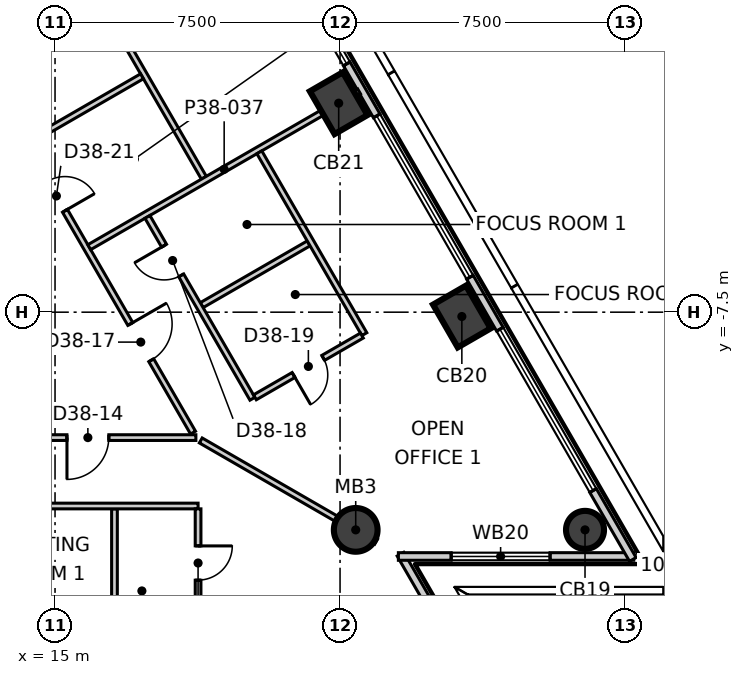
"""IFC4 building model, lengths in metres.
Left out: names, types, materials, properties, quantities, classifications, styles, units other than length and angle.
Written with IfcOpenShell. Run it as: python <this file> out.ifc"""

import sys

from ifc_helpers import new_model, si_unit, direction, frame, frame_2d, origin, origin_2d, place, context, subcontext, project, spatial, rectangle, circle, extrude, element, fill, save


model = new_model("IFC4")
c1 = context("Model", 3, precision=1e-05, world=origin(), true_north=direction((0.0, 1.0)))
c2 = subcontext(c1, "Body", "Model", "MODEL_VIEW")
j1 = project(units=[si_unit("LENGTHUNIT", "METRE"), si_unit("PLANEANGLEUNIT", "RADIAN")], contexts=[c1])
p1 = place(None, origin())
s1 = spatial("IfcSite", under=j1, at=p1, CompositionType="ELEMENT")
p2 = place(p1, origin())
s2 = spatial("IfcBuilding", under=s1, at=p2, CompositionType="ELEMENT")
p3 = place(p2, frame((0.0, 0.0, 164.3)))
s3 = spatial("IfcBuildingStorey", under=s2, at=p3, CompositionType="ELEMENT", Elevation=164.3)
p4 = place(p3, frame((28.946, -13.228, -0.3), z_axis=(0.0, 0.0, 1.0), x_axis=(-0.5, 0.866025403784, 0.0)))
e1 = element("IfcColumn", 1, at=p4, inside=s3, PredefinedType="COLUMN", context=c2, shape_type="SweptSolid", body=[
    extrude(circle(Radius=0.5, at=origin_2d()), origin(), (0.0, 0.0, 1.0), 4.0),
])
for number, where, z_axis, x_axis in (
    (2, (25.705, -7.614, -0.3), (0.0, 0.0, 1.0), (-0.5, 0.866, 0.0)),
    (3, (22.464, -2.001, -0.3), (0.0, 0.0, 1.0), (-0.5, 0.866, 0.0)),
):
    element("IfcColumn", number, at=place(p3, frame(where, z_axis=z_axis, x_axis=x_axis)), inside=s3, PredefinedType="COLUMN", context=c2, shape_type="SweptSolid", body=[
        extrude(rectangle(XDim=1.3, YDim=1.0, at=origin_2d()), origin(), (0.0, 0.0, 1.0), 4.0),
    ])
p5 = place(p3, frame((22.912, -13.228, -0.3), z_axis=(0.0, 0.0, 1.0), x_axis=(1.0, 0.0, 0.0)))
e4 = element("IfcColumn", 4, at=p5, inside=s3, PredefinedType="COLUMN", context=c2, shape_type="SweptSolid", body=[
    extrude(circle(Radius=0.575, at=origin_2d()), origin(), (0.0, 0.0, 1.0), 4.0),
])
p6 = place(p3, frame((27.187, -19.232, 0.0), z_axis=(0.0, 0.0, 1.0), x_axis=(-0.499932836684, 0.86606417707, 0.0)))
e5 = element("IfcWall", 5, at=p6, inside=s3, PredefinedType="ELEMENTEDWALL", context=c2, shape_type="SweptSolid", body=[
    extrude(rectangle(XDim=6.195, YDim=0.2, at=frame_2d((3.097, 0.0))), origin(), (0.0, 0.0, 1.0), 3.7),
])
p7 = place(p6, frame((1.99, 0.0, 0.9)))
e6 = element("IfcOpeningElement", 6, at=p7, cuts=e5, PredefinedType="OPENING", context=c2, shape_type="SweptSolid", body=[
    extrude(rectangle(XDim=2.6, YDim=2.5, at=frame_2d((1.3, 1.25))), frame((0.0, 0.11, 0.0), z_axis=(0.0, -1.0, 0.0), x_axis=(1.0, 0.0, 0.0)), (0.0, 0.0, 1.0), 0.22),
])
p8 = place(p3, frame((24.035, -13.928, 0.0), z_axis=(0.0, 0.0, 1.0), x_axis=(1.0, 0.0, 0.0)))
e7 = element("IfcWall", 7, at=p8, inside=s3, PredefinedType="ELEMENTEDWALL", context=c2, shape_type="SweptSolid", body=[
    extrude(rectangle(XDim=6.194, YDim=0.2, at=frame_2d((3.097, 0.0))), origin(), (0.0, 0.0, 1.0), 3.7),
])
p9 = place(p8, frame((1.39, 0.0, 0.9)))
e8 = element("IfcOpeningElement", 8, at=p9, cuts=e7, PredefinedType="OPENING", context=c2, shape_type="SweptSolid", body=[
    extrude(rectangle(XDim=2.6, YDim=2.5, at=frame_2d((1.3, 1.25))), frame((0.0, 0.11, 0.0), z_axis=(0.0, -1.0, 0.0), x_axis=(1.0, 0.0, 0.0)), (0.0, 0.0, 1.0), 0.22),
])
p10 = place(p3, frame((30.204, -14.006, 0.0), z_axis=(0.0, 0.0, 1.0), x_axis=(-0.500008017777, 0.866020774669, 0.0)))
e9 = element("IfcWall", 9, at=p10, inside=s3, PredefinedType="ELEMENTEDWALL", context=c2, shape_type="SweptSolid", body=[
    extrude(rectangle(XDim=54.443, YDim=0.2, at=frame_2d((27.222, 0.0))), origin(), (0.0, 0.0, 1.0), 3.7),
])
p11 = place(p10, frame((2.094, 0.0, 0.9)))
e10 = element("IfcOpeningElement", 10, at=p11, cuts=e9, PredefinedType="OPENING", context=c2, shape_type="SweptSolid", body=[
    extrude(rectangle(XDim=4.9, YDim=2.5, at=frame_2d((2.45, 1.25))), frame((0.0, 0.11, 0.0), z_axis=(0.0, -1.0, 0.0), x_axis=(1.0, 0.0, 0.0)), (0.0, 0.0, 1.0), 0.22),
])
p12 = place(p10, frame((8.576, 0.0, 0.9)))
e11 = element("IfcOpeningElement", 11, at=p12, cuts=e9, PredefinedType="OPENING", context=c2, shape_type="SweptSolid", body=[
    extrude(rectangle(XDim=4.9, YDim=2.5, at=frame_2d((2.45, 1.25))), frame((0.0, 0.11, 0.0), z_axis=(0.0, -1.0, 0.0), x_axis=(1.0, 0.0, 0.0)), (0.0, 0.0, 1.0), 0.22),
])
p13 = place(p10, frame((15.058, 0.0, 0.9)))
e12 = element("IfcOpeningElement", 12, at=p13, cuts=e9, PredefinedType="OPENING", context=c2, shape_type="SweptSolid", body=[
    extrude(rectangle(XDim=4.9, YDim=2.5, at=frame_2d((2.45, 1.25))), frame((0.0, 0.11, 0.0), z_axis=(0.0, -1.0, 0.0), x_axis=(1.0, 0.0, 0.0)), (0.0, 0.0, 1.0), 0.22),
])
p14 = place(p10, frame((21.54, 0.0, 0.9)))
e13 = element("IfcOpeningElement", 13, at=p14, cuts=e9, PredefinedType="OPENING", context=c2, shape_type="SweptSolid", body=[
    extrude(rectangle(XDim=4.9, YDim=2.5, at=frame_2d((2.45, 1.25))), frame((0.0, 0.11, 0.0), z_axis=(0.0, -1.0, 0.0), x_axis=(1.0, 0.0, 0.0)), (0.0, 0.0, 1.0), 0.22),
])
p15 = place(p10, frame((28.023, 0.0, 0.9)))
e14 = element("IfcOpeningElement", 14, at=p15, cuts=e9, PredefinedType="OPENING", context=c2, shape_type="SweptSolid", body=[
    extrude(rectangle(XDim=4.9, YDim=2.5, at=frame_2d((2.45, 1.25))), frame((0.0, 0.11, 0.0), z_axis=(0.0, -1.0, 0.0), x_axis=(1.0, 0.0, 0.0)), (0.0, 0.0, 1.0), 0.22),
])
p16 = place(p10, frame((34.505, 0.0, 0.9)))
e15 = element("IfcOpeningElement", 15, at=p16, cuts=e9, PredefinedType="OPENING", context=c2, shape_type="SweptSolid", body=[
    extrude(rectangle(XDim=4.9, YDim=2.5, at=frame_2d((2.45, 1.25))), frame((0.0, 0.11, 0.0), z_axis=(0.0, -1.0, 0.0), x_axis=(1.0, 0.0, 0.0)), (0.0, 0.0, 1.0), 0.22),
])
p17 = place(p10, frame((40.987, 0.0, 0.9)))
e16 = element("IfcOpeningElement", 16, at=p17, cuts=e9, PredefinedType="OPENING", context=c2, shape_type="SweptSolid", body=[
    extrude(rectangle(XDim=4.9, YDim=2.5, at=frame_2d((2.45, 1.25))), frame((0.0, 0.11, 0.0), z_axis=(0.0, -1.0, 0.0), x_axis=(1.0, 0.0, 0.0)), (0.0, 0.0, 1.0), 0.22),
])
p18 = place(p10, frame((47.469, 0.0, 0.9)))
e17 = element("IfcOpeningElement", 17, at=p18, cuts=e9, PredefinedType="OPENING", context=c2, shape_type="SweptSolid", body=[
    extrude(rectangle(XDim=4.9, YDim=2.5, at=frame_2d((2.45, 1.25))), frame((0.0, 0.11, 0.0), z_axis=(0.0, -1.0, 0.0), x_axis=(1.0, 0.0, 0.0)), (0.0, 0.0, 1.0), 0.22),
])
p19 = place(p3, frame((-5.581, -10.8, 0.0), z_axis=(0.0, 0.0, 1.0), x_axis=(1.0, 0.0, 0.0)))
e18 = element("IfcWall", 18, at=p19, inside=s3, PredefinedType="PARTITIONING", context=c2, shape_type="SweptSolid", body=[
    extrude(rectangle(XDim=24.287, YDim=0.15, at=frame_2d((12.144, 0.0))), origin(), (0.0, 0.0, 1.0), 3.7),
])
p20 = place(p19, frame((5.549, 0.0, 0.0)))
e19 = element("IfcOpeningElement", 19, at=p20, cuts=e18, PredefinedType="OPENING", context=c2, shape_type="SweptSolid", body=[
    extrude(rectangle(XDim=1.0, YDim=2.1, at=frame_2d((0.5, 1.05))), frame((0.0, 0.085, 0.0), z_axis=(0.0, -1.0, 0.0), x_axis=(1.0, 0.0, 0.0)), (0.0, 0.0, 1.0), 0.17),
])
p21 = place(p19, frame((14.813, 0.0, 0.0)))
e20 = element("IfcOpeningElement", 20, at=p21, cuts=e18, PredefinedType="OPENING", context=c2, shape_type="SweptSolid", body=[
    extrude(rectangle(XDim=1.0, YDim=2.1, at=frame_2d((0.5, 1.05))), frame((0.0, 0.085, 0.0), z_axis=(0.0, -1.0, 0.0), x_axis=(1.0, 0.0, 0.0)), (0.0, 0.0, 1.0), 0.17),
])
p22 = place(p19, frame((20.895, 0.0, 0.0)))
e21 = element("IfcOpeningElement", 21, at=p22, cuts=e18, PredefinedType="OPENING", context=c2, shape_type="SweptSolid", body=[
    extrude(rectangle(XDim=1.1, YDim=2.1, at=frame_2d((0.55, 1.05))), frame((0.0, 0.085, 0.0), z_axis=(0.0, -1.0, 0.0), x_axis=(1.0, 0.0, 0.0)), (0.0, 0.0, 1.0), 0.17),
])
p23 = place(p3, frame((18.835, -10.875, 0.0), z_axis=(0.0, 0.0, 1.0), x_axis=(0.866012362072, -0.500022588228, 0.0)))
e22 = element("IfcWall", 22, at=p23, inside=s3, PredefinedType="PARTITIONING", context=c2, shape_type="SweptSolid", body=[
    extrude(rectangle(XDim=5.328, YDim=0.15, at=frame_2d((2.664, 0.0))), origin(), (0.0, 0.0, 1.0), 3.2),
])
p24 = place(p3, frame((9.804, 4.62, 0.0), z_axis=(0.0, 0.0, 1.0), x_axis=(0.500000173646, -0.86602530353, 0.0)))
e23 = element("IfcWall", 23, at=p24, inside=s3, PredefinedType="PARTITIONING", context=c2, shape_type="SweptSolid", body=[
    extrude(rectangle(XDim=17.654, YDim=0.15, at=frame_2d((8.827, 0.0))), origin(), (0.0, 0.0, 1.0), 3.7),
])
p25 = place(p24, frame((14.354, 0.0, 0.0)))
e24 = element("IfcOpeningElement", 24, at=p25, cuts=e23, PredefinedType="OPENING", context=c2, shape_type="SweptSolid", body=[
    extrude(rectangle(XDim=1.1, YDim=2.1, at=frame_2d((0.55, 1.05))), frame((0.0, 0.085, 0.0), z_axis=(0.0, -1.0, 0.0), x_axis=(1.0, 0.0, 0.0)), (0.0, 0.0, 1.0), 0.17),
])
p26 = place(p24, frame((10.014, 0.0, 0.0)))
e25 = element("IfcOpeningElement", 25, at=p26, cuts=e23, PredefinedType="OPENING", context=c2, shape_type="SweptSolid", body=[
    extrude(rectangle(XDim=0.9, YDim=2.1, at=frame_2d((0.45, 1.05))), frame((0.0, 0.085, 0.0), z_axis=(0.0, -1.0, 0.0), x_axis=(1.0, 0.0, 0.0)), (0.0, 0.0, 1.0), 0.17),
])
p27 = place(p24, frame((6.814, 0.0, 0.0)))
e26 = element("IfcOpeningElement", 26, at=p27, cuts=e23, PredefinedType="OPENING", context=c2, shape_type="SweptSolid", body=[
    extrude(rectangle(XDim=0.9, YDim=2.1, at=frame_2d((0.45, 1.05))), frame((0.0, 0.085, 0.0), z_axis=(0.0, -1.0, 0.0), x_axis=(1.0, 0.0, 0.0)), (0.0, 0.0, 1.0), 0.17),
])
p28 = place(p24, frame((4.014, 0.0, 0.0)))
e27 = element("IfcOpeningElement", 27, at=p28, cuts=e23, PredefinedType="OPENING", context=c2, shape_type="SweptSolid", body=[
    extrude(rectangle(XDim=1.0, YDim=2.1, at=frame_2d((0.5, 1.05))), frame((0.0, 0.085, 0.0), z_axis=(0.0, -1.0, 0.0), x_axis=(1.0, 0.0, 0.0)), (0.0, 0.0, 1.0), 0.17),
])
p29 = place(p3, frame((14.553, 3.593, 0.0), z_axis=(0.0, 0.0, 1.0), x_axis=(0.500054279689, -0.865994063124, 0.0)))
e28 = element("IfcWall", 28, at=p29, inside=s3, PredefinedType="PARTITIONING", context=c2, shape_type="SweptSolid", body=[
    extrude(rectangle(XDim=8.725, YDim=0.15, at=frame_2d((4.363, 0.0))), origin(), (0.0, 0.0, 1.0), 3.7),
])
p30 = place(p3, frame((14.3, -3.019, 0.0), z_axis=(0.0, 0.0, 1.0), x_axis=(0.866031223622, 0.49998991961, 0.0)))
e29 = element("IfcWall", 29, at=p30, inside=s3, PredefinedType="PARTITIONING", context=c2, shape_type="SweptSolid", body=[
    extrude(rectangle(XDim=3.45, YDim=0.15, at=frame_2d((1.725, 0.0))), origin(), (0.0, 0.0, 1.0), 3.7),
])
p31 = place(p3, frame((15.9, -5.79, 0.0), z_axis=(0.0, 0.0, 1.0), x_axis=(0.866061630889, 0.499937247563, 0.0)))
e30 = element("IfcWall", 30, at=p31, inside=s3, PredefinedType="PARTITIONING", context=c2, shape_type="SweptSolid", body=[
    extrude(rectangle(XDim=8.199, YDim=0.15, at=frame_2d((4.1, 0.0))), origin(), (0.0, 0.0, 1.0), 3.7),
])
p32 = place(p3, frame((16.564, -16.325, 0.0), z_axis=(0.0, 0.0, 1.0), x_axis=(0.0, 1.0, 0.0)))
e31 = element("IfcWall", 31, at=p32, inside=s3, PredefinedType="PARTITIONING", context=c2, shape_type="SweptSolid", body=[
    extrude(rectangle(XDim=3.65, YDim=0.15, at=frame_2d((1.825, 0.0))), origin(), (0.0, 0.0, 1.0), 3.7),
])
p33 = place(p3, frame((13.039, -12.6, 0.0), z_axis=(0.0, 0.0, 1.0), x_axis=(1.0, 0.0, 0.0)))
e32 = element("IfcWall", 32, at=p33, inside=s3, PredefinedType="PARTITIONING", context=c2, shape_type="SweptSolid", body=[
    extrude(rectangle(XDim=5.725, YDim=0.15, at=frame_2d((2.862, 0.0))), origin(), (0.0, 0.0, 1.0), 3.7),
])
p34 = place(p3, frame((18.764, -15.525, 0.0), z_axis=(0.0, 0.0, 1.0), x_axis=(0.0, 1.0, 0.0)))
e33 = element("IfcWall", 33, at=p34, inside=s3, PredefinedType="PARTITIONING", context=c2, shape_type="SweptSolid", body=[
    extrude(rectangle(XDim=2.85, YDim=0.15, at=frame_2d((1.425, 0.0))), origin(), (0.0, 0.0, 1.0), 3.7),
])
p35 = place(p34, frame((0.975, 0.0, 0.0)))
e34 = element("IfcOpeningElement", 34, at=p35, cuts=e33, PredefinedType="OPENING", context=c2, shape_type="SweptSolid", body=[
    extrude(rectangle(XDim=0.9, YDim=2.1, at=frame_2d((0.45, 1.05))), frame((0.0, 0.085, 0.0), z_axis=(0.0, -1.0, 0.0), x_axis=(1.0, 0.0, 0.0)), (0.0, 0.0, 1.0), 0.17),
])
p36 = place(p3, frame((18.859, -7.315, 0.0), z_axis=(0.0, 0.0, 1.0), x_axis=(0.866071776036, 0.499919672301, 0.0)))
e35 = element("IfcWall", 35, at=p36, inside=s3, PredefinedType="PARTITIONING", context=c2, shape_type="SweptSolid", body=[
    extrude(rectangle(XDim=3.25, YDim=0.15, at=frame_2d((1.625, 0.0))), origin(), (0.0, 0.0, 1.0), 3.7),
])
p37 = place(p3, frame((20.376, -3.293, 0.0), z_axis=(0.0, 0.0, 1.0), x_axis=(0.500050108258, -0.865996471835, 0.0)))
e36 = element("IfcWall", 36, at=p37, inside=s3, PredefinedType="PARTITIONING", context=c2, shape_type="SweptSolid", body=[
    extrude(rectangle(XDim=5.525, YDim=0.15, at=frame_2d((2.763, 0.0))), origin(), (0.0, 0.0, 1.0), 3.7),
])
p38 = place(p3, frame((17.432, -4.993, 0.0), z_axis=(0.0, 0.0, 1.0), x_axis=(0.499931554694, -0.866064917094, 0.0)))
e37 = element("IfcWall", 37, at=p38, inside=s3, PredefinedType="PARTITIONING", context=c2, shape_type="SweptSolid", body=[
    extrude(rectangle(XDim=5.525, YDim=0.15, at=frame_2d((2.763, 0.0))), origin(), (0.0, 0.0, 1.0), 3.7),
])
p39 = place(p38, frame((0.875, 0.0, 0.0)))
e38 = element("IfcOpeningElement", 38, at=p39, cuts=e37, PredefinedType="OPENING", context=c2, shape_type="SweptSolid", body=[
    extrude(rectangle(XDim=0.9, YDim=2.1, at=frame_2d((0.45, 1.05))), frame((0.0, 0.085, 0.0), z_axis=(0.0, -1.0, 0.0), x_axis=(1.0, 0.0, 0.0)), (0.0, 0.0, 1.0), 0.17),
])
p40 = place(p3, frame((20.259, -9.74, 0.0), z_axis=(0.0, 0.0, 1.0), x_axis=(0.866053003207, 0.499952193351, 0.0)))
e39 = element("IfcWall", 39, at=p40, inside=s3, PredefinedType="PARTITIONING", context=c2, shape_type="SweptSolid", body=[
    extrude(rectangle(XDim=3.25, YDim=0.15, at=frame_2d((1.625, 0.0))), origin(), (0.0, 0.0, 1.0), 3.7),
])
p41 = place(p40, frame((1.175, 0.0, 0.0)))
e40 = element("IfcOpeningElement", 40, at=p41, cuts=e39, PredefinedType="OPENING", context=c2, shape_type="SweptSolid", body=[
    extrude(rectangle(XDim=0.9, YDim=2.1, at=frame_2d((0.45, 1.05))), frame((0.0, 0.085, 0.0), z_axis=(0.0, -1.0, 0.0), x_axis=(1.0, 0.0, 0.0)), (0.0, 0.0, 1.0), 0.17),
])
p42 = place(p9, origin())
e41 = element("IfcWindow", 41, at=p42, inside=s3, PartitioningType="SINGLE_PANEL", PredefinedType="WINDOW", context=c2, shape_type="SweptSolid", body=[
    extrude(rectangle(XDim=2.6, YDim=2.5, at=frame_2d((1.3, 1.25))), frame((0.0, 0.03, 0.0), z_axis=(0.0, -1.0, 0.0), x_axis=(1.0, 0.0, 0.0)), (0.0, 0.0, 1.0), 0.06),
])
fill(e8, e41)
p43 = place(p11, origin())
e42 = element("IfcWindow", 42, at=p43, inside=s3, PartitioningType="SINGLE_PANEL", PredefinedType="WINDOW", context=c2, shape_type="SweptSolid", body=[
    extrude(rectangle(XDim=4.9, YDim=2.5, at=frame_2d((2.45, 1.25))), frame((0.0, 0.03, 0.0), z_axis=(0.0, -1.0, 0.0), x_axis=(1.0, 0.0, 0.0)), (0.0, 0.0, 1.0), 0.06),
])
fill(e10, e42)
p44 = place(p12, origin())
e43 = element("IfcWindow", 43, at=p44, inside=s3, PartitioningType="SINGLE_PANEL", PredefinedType="WINDOW", context=c2, shape_type="SweptSolid", body=[
    extrude(rectangle(XDim=4.9, YDim=2.5, at=frame_2d((2.45, 1.25))), frame((0.0, 0.03, 0.0), z_axis=(0.0, -1.0, 0.0), x_axis=(1.0, 0.0, 0.0)), (0.0, 0.0, 1.0), 0.06),
])
fill(e11, e43)
p45 = place(p13, origin())
e44 = element("IfcWindow", 44, at=p45, inside=s3, PartitioningType="SINGLE_PANEL", PredefinedType="WINDOW", context=c2, shape_type="SweptSolid", body=[
    extrude(rectangle(XDim=4.9, YDim=2.5, at=frame_2d((2.45, 1.25))), frame((0.0, 0.03, 0.0), z_axis=(0.0, -1.0, 0.0), x_axis=(1.0, 0.0, 0.0)), (0.0, 0.0, 1.0), 0.06),
])
fill(e12, e44)
p46 = place(p22, origin())
e45 = element("IfcDoor", 45, at=p46, inside=s3, OperationType="SINGLE_SWING_LEFT", PredefinedType="DOOR", context=c2, shape_type="SweptSolid", body=[
    extrude(rectangle(XDim=1.1, YDim=2.1, at=frame_2d((0.55, 1.05))), frame((0.0, 0.025, 0.0), z_axis=(0.0, -1.0, 0.0), x_axis=(1.0, 0.0, 0.0)), (0.0, 0.0, 1.0), 0.05),
])
fill(e21, e45)
p47 = place(p35, origin())
e46 = element("IfcDoor", 46, at=p47, inside=s3, OperationType="SINGLE_SWING_RIGHT", PredefinedType="DOOR", context=c2, shape_type="SweptSolid", body=[
    extrude(rectangle(XDim=0.9, YDim=2.1, at=frame_2d((0.45, 1.05))), frame((0.0, 0.025, 0.0), z_axis=(0.0, -1.0, 0.0), x_axis=(1.0, 0.0, 0.0)), (0.0, 0.0, 1.0), 0.05),
])
fill(e34, e46)
p48 = place(p25, origin())
e47 = element("IfcDoor", 47, at=p48, inside=s3, OperationType="SINGLE_SWING_RIGHT", PredefinedType="DOOR", context=c2, shape_type="SweptSolid", body=[
    extrude(rectangle(XDim=1.1, YDim=2.1, at=frame_2d((0.55, 1.05))), frame((0.0, 0.025, 0.0), z_axis=(0.0, -1.0, 0.0), x_axis=(1.0, 0.0, 0.0)), (0.0, 0.0, 1.0), 0.05),
])
fill(e24, e47)
p49 = place(p39, origin())
e48 = element("IfcDoor", 48, at=p49, inside=s3, OperationType="SINGLE_SWING_LEFT", PredefinedType="DOOR", context=c2, shape_type="SweptSolid", body=[
    extrude(rectangle(XDim=0.9, YDim=2.1, at=frame_2d((0.45, 1.05))), frame((0.0, 0.025, 0.0), z_axis=(0.0, -1.0, 0.0), x_axis=(1.0, 0.0, 0.0)), (0.0, 0.0, 1.0), 0.05),
])
fill(e38, e48)
p50 = place(p41, origin())
e49 = element("IfcDoor", 49, at=p50, inside=s3, OperationType="SINGLE_SWING_LEFT", PredefinedType="DOOR", context=c2, shape_type="SweptSolid", body=[
    extrude(rectangle(XDim=0.9, YDim=2.1, at=frame_2d((0.45, 1.05))), frame((0.0, 0.025, 0.0), z_axis=(0.0, -1.0, 0.0), x_axis=(1.0, 0.0, 0.0)), (0.0, 0.0, 1.0), 0.05),
])
fill(e40, e49)
p51 = place(p26, origin())
e50 = element("IfcDoor", 50, at=p51, inside=s3, OperationType="SINGLE_SWING_LEFT", PredefinedType="DOOR", context=c2, shape_type="SweptSolid", body=[
    extrude(rectangle(XDim=0.9, YDim=2.1, at=frame_2d((0.45, 1.05))), frame((0.0, 0.025, 0.0), z_axis=(0.0, -1.0, 0.0), x_axis=(1.0, 0.0, 0.0)), (0.0, 0.0, 1.0), 0.05),
])
fill(e25, e50)
save(model, sys.argv[1])
